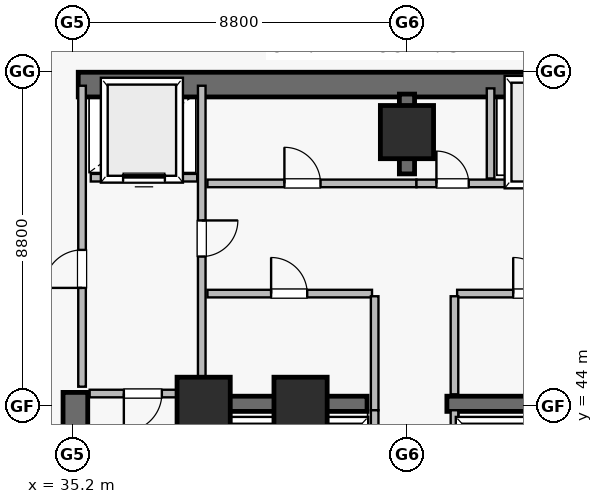
"""IFC4 building model, lengths in metres.
Left out: names, types, materials, properties, quantities, classifications, styles, units other than length and angle.
Written with IfcOpenShell. Run it as: python <this file> out.ifc"""

import sys

from ifc_helpers import new_model, si_unit, direction, frame, frame_2d, origin, origin_2d, place, context, subcontext, project, spatial, rectangle, extrude, element, fill, save


model = new_model("IFC4")
c1 = context("Model", 3, precision=1e-05, world=origin(), true_north=direction((0.0, 1.0)))
c2 = subcontext(c1, "Body", "Model", "MODEL_VIEW")
j1 = project(units=[si_unit("LENGTHUNIT", "METRE"), si_unit("PLANEANGLEUNIT", "RADIAN")], contexts=[c1])
p1 = place(None, origin())
s1 = spatial("IfcSite", under=j1, at=p1, CompositionType="ELEMENT")
p2 = place(p1, origin())
s2 = spatial("IfcBuilding", under=s1, at=p2, CompositionType="ELEMENT")
p3 = place(p2, frame((0.0, 0.0, -3.9)))
s3 = spatial("IfcBuildingStorey", under=s2, at=p3, CompositionType="ELEMENT", Elevation=-3.9)
p4 = place(p3, frame((35.35, 52.45, 0.0), z_axis=(0.0, 0.0, 1.0), x_axis=(1.0, 0.0, 0.0)))
e1 = element("IfcWall", 1, at=p4, inside=s3, PredefinedType="SHEAR", context=c2, shape_type="SweptSolid", body=[
    extrude(rectangle(XDim=17.3, YDim=0.65, at=frame_2d((8.65, 0.0))), origin(), (0.0, 0.0, 1.0), 3.6),
])
p5 = place(p3, frame((35.275, 34.95, 0.0), z_axis=(0.0, 0.0, 1.0), x_axis=(0.0, 1.0, 0.0)))
e2 = element("IfcWall", 2, at=p5, inside=s3, PredefinedType="SHEAR", context=c2, shape_type="SweptSolid", body=[
    extrude(rectangle(XDim=9.4, YDim=0.65, at=frame_2d((4.7, 0.0))), origin(), (0.0, 0.0, 1.0), 3.6),
])
p6 = place(p3, frame((38.775, 35.4, 0.0), z_axis=(0.0, 0.0, 1.0), x_axis=(0.0, 1.0, 0.0)))
e3 = element("IfcWall", 3, at=p6, inside=s3, PredefinedType="SHEAR", context=c2, shape_type="SweptSolid", body=[
    extrude(rectangle(XDim=8.95, YDim=0.65, at=frame_2d((4.475, 0.0))), origin(), (0.0, 0.0, 1.0), 3.6),
])
p7 = place(p3, frame((44.0, 50.1, 0.0), z_axis=(0.0, 0.0, 1.0), x_axis=(0.0, 1.0, 0.0)))
e4 = element("IfcWall", 4, at=p7, inside=s3, PredefinedType="SHEAR", context=c2, shape_type="SweptSolid", body=[
    extrude(rectangle(XDim=2.1, YDim=0.4, at=frame_2d((1.05, 0.0))), origin(), (0.0, 0.0, 1.0), 3.6),
])
for number, where, z_axis, x_axis in (
    (5, (38.75, 44.05, 0.0), (0.0, 0.0, 1.0), (1.0, 0.0, 0.0)),
    (6, (45.05, 44.05, 0.0), (0.0, 0.0, 1.0), (1.0, 0.0, 0.0)),
):
    element("IfcWall", number, at=place(p3, frame(where, z_axis=z_axis, x_axis=x_axis)), inside=s3, PredefinedType="SHEAR", context=c2, shape_type="SweptSolid", body=[
        extrude(rectangle(XDim=4.2, YDim=0.4, at=frame_2d((2.1, 0.0))), origin(), (0.0, 0.0, 1.0), 3.6),
    ])
for number, where, z_axis, x_axis in (
    (7, (38.65, 44.05, 0.0), (0.0, 0.0, 1.0), (1.0, 0.0, 0.0)),
    (8, (44.0, 51.2, 0.0), (0.0, 0.0, 1.0), (1.0, 0.0, 0.0)),
    (9, (41.2, 44.05, 0.0), (0.0, 0.0, 1.0), (1.0, 0.0, 0.0)),
):
    element("IfcColumn", number, at=place(p3, frame(where, z_axis=z_axis, x_axis=x_axis)), inside=s3, PredefinedType="COLUMN", context=c2, shape_type="SweptSolid", body=[
        extrude(rectangle(XDim=1.4, YDim=1.4, at=origin_2d()), origin(), (0.0, 0.0, 1.0), 3.9),
    ])
p8 = place(p3, frame((35.45, 44.5, 0.0), z_axis=(0.0, 0.0, 1.0), x_axis=(0.0, 1.0, 0.0)))
e10 = element("IfcWall", 10, at=p8, inside=s3, PredefinedType="SOLIDWALL", context=c2, shape_type="SweptSolid", body=[
    extrude(rectangle(XDim=7.92, YDim=0.2, at=frame_2d((3.96, 0.0))), origin(), (0.0, 0.0, 1.0), 3.6),
])
p9 = place(p8, frame((2.6, 0.0, 0.0)))
e11 = element("IfcOpeningElement", 11, at=p9, cuts=e10, PredefinedType="OPENING", context=c2, shape_type="SweptSolid", body=[
    extrude(rectangle(XDim=1.0, YDim=2.15, at=frame_2d((0.5, 1.075))), frame((0.0, 0.11, 0.0), z_axis=(0.0, -1.0, 0.0), x_axis=(1.0, 0.0, 0.0)), (0.0, 0.0, 1.0), 0.22),
])
p10 = place(p3, frame((38.6, 44.5, 0.0), z_axis=(0.0, 0.0, 1.0), x_axis=(0.0, 1.0, 0.0)))
e12 = element("IfcWall", 12, at=p10, inside=s3, PredefinedType="SOLIDWALL", context=c2, shape_type="SweptSolid", body=[
    extrude(rectangle(XDim=7.92, YDim=0.2, at=frame_2d((3.96, 0.0))), origin(), (0.0, 0.0, 1.0), 3.6),
])
p11 = place(p10, frame((3.425, 0.0, 0.0)))
e13 = element("IfcOpeningElement", 13, at=p11, cuts=e12, PredefinedType="OPENING", context=c2, shape_type="SweptSolid", body=[
    extrude(rectangle(XDim=0.95, YDim=2.15, at=frame_2d((0.475, 1.075))), frame((0.0, 0.11, 0.0), z_axis=(0.0, -1.0, 0.0), x_axis=(1.0, 0.0, 0.0)), (0.0, 0.0, 1.0), 0.22),
])
p12 = place(p3, frame((38.75, 49.85, 0.0), z_axis=(0.0, 0.0, 1.0), x_axis=(1.0, 0.0, 0.0)))
e14 = element("IfcWall", 14, at=p12, inside=s3, PredefinedType="SOLIDWALL", context=c2, shape_type="SweptSolid", body=[
    extrude(rectangle(XDim=5.5, YDim=0.2, at=frame_2d((2.75, 0.0))), origin(), (0.0, 0.0, 1.0), 3.6),
])
p13 = place(p12, frame((2.025, 0.0, 0.0)))
e15 = element("IfcOpeningElement", 15, at=p13, cuts=e14, PredefinedType="OPENING", context=c2, shape_type="SweptSolid", body=[
    extrude(rectangle(XDim=0.95, YDim=2.15, at=frame_2d((0.475, 1.075))), frame((0.0, 0.11, 0.0), z_axis=(0.0, -1.0, 0.0), x_axis=(1.0, 0.0, 0.0)), (0.0, 0.0, 1.0), 0.22),
])
p14 = place(p3, frame((44.25, 49.85, 0.0), z_axis=(0.0, 0.0, 1.0), x_axis=(1.0, 0.0, 0.0)))
e16 = element("IfcWall", 16, at=p14, inside=s3, PredefinedType="SOLIDWALL", context=c2, shape_type="SweptSolid", body=[
    extrude(rectangle(XDim=5.0, YDim=0.2, at=frame_2d((2.5, 0.0))), origin(), (0.0, 0.0, 1.0), 2.938),
])
p15 = place(p14, frame((0.525, 0.0, 0.0)))
e17 = element("IfcOpeningElement", 17, at=p15, cuts=e16, PredefinedType="OPENING", context=c2, shape_type="SweptSolid", body=[
    extrude(rectangle(XDim=0.85, YDim=2.1, at=frame_2d((0.425, 1.05))), frame((0.0, 0.11, 0.0), z_axis=(0.0, -1.0, 0.0), x_axis=(1.0, 0.0, 0.0)), (0.0, 0.0, 1.0), 0.22),
])
p16 = place(p14, frame((2.95, 0.0, 0.0)))
e18 = element("IfcOpeningElement", 18, at=p16, cuts=e16, PredefinedType="OPENING", context=c2, shape_type="SweptSolid", body=[
    extrude(rectangle(XDim=1.1, YDim=2.15, at=frame_2d((0.55, 1.075))), frame((0.0, 0.11, 0.0), z_axis=(0.0, -1.0, 0.0), x_axis=(1.0, 0.0, 0.0)), (0.0, 0.0, 1.0), 0.22),
])
p17 = place(p3, frame((38.75, 46.95, 0.0), z_axis=(0.0, 0.0, 1.0), x_axis=(1.0, 0.0, 0.0)))
e19 = element("IfcWall", 19, at=p17, inside=s3, PredefinedType="SOLIDWALL", context=c2, shape_type="SweptSolid", body=[
    extrude(rectangle(XDim=4.33, YDim=0.2, at=frame_2d((2.165, 0.0))), origin(), (0.0, 0.0, 1.0), 3.6),
])
p18 = place(p17, frame((1.675, 0.0, 0.0)))
e20 = element("IfcOpeningElement", 20, at=p18, cuts=e19, PredefinedType="OPENING", context=c2, shape_type="SweptSolid", body=[
    extrude(rectangle(XDim=0.95, YDim=2.15, at=frame_2d((0.475, 1.075))), frame((0.0, 0.11, 0.0), z_axis=(0.0, -1.0, 0.0), x_axis=(1.0, 0.0, 0.0)), (0.0, 0.0, 1.0), 0.22),
])
p19 = place(p3, frame((45.32, 46.95, 0.0), z_axis=(0.0, 0.0, 1.0), x_axis=(1.0, 0.0, 0.0)))
e21 = element("IfcWall", 21, at=p19, inside=s3, PredefinedType="SOLIDWALL", context=c2, shape_type="SweptSolid", body=[
    extrude(rectangle(XDim=3.93, YDim=0.2, at=frame_2d((1.965, 0.0))), origin(), (0.0, 0.0, 1.0), 2.938),
])
p20 = place(p19, frame((1.475, 0.0, 0.0)))
e22 = element("IfcOpeningElement", 22, at=p20, cuts=e21, PredefinedType="OPENING", context=c2, shape_type="SweptSolid", body=[
    extrude(rectangle(XDim=0.95, YDim=2.15, at=frame_2d((0.475, 1.075))), frame((0.0, 0.11, 0.0), z_axis=(0.0, -1.0, 0.0), x_axis=(1.0, 0.0, 0.0)), (0.0, 0.0, 1.0), 0.22),
])
p21 = place(p3, frame((35.65, 44.32, 0.0), z_axis=(0.0, 0.0, 1.0), x_axis=(1.0, 0.0, 0.0)))
e23 = element("IfcWall", 23, at=p21, inside=s3, PredefinedType="SOLIDWALL", context=c2, shape_type="SweptSolid", body=[
    extrude(rectangle(XDim=2.8, YDim=0.2, at=frame_2d((1.4, 0.0))), origin(), (0.0, 0.0, 1.0), 3.6),
])
p22 = place(p21, frame((0.9, 0.0, 0.0)))
e24 = element("IfcOpeningElement", 24, at=p22, cuts=e23, PredefinedType="OPENING", context=c2, shape_type="SweptSolid", body=[
    extrude(rectangle(XDim=1.0, YDim=2.15, at=frame_2d((0.5, 1.075))), frame((0.0, 0.11, 0.0), z_axis=(0.0, -1.0, 0.0), x_axis=(1.0, 0.0, 0.0)), (0.0, 0.0, 1.0), 0.22),
])
p23 = place(p3, frame((35.68, 50.0, 0.0), z_axis=(0.0, 0.0, 1.0), x_axis=(1.0, 0.0, 0.0)))
e25 = element("IfcWall", 25, at=p23, inside=s3, PredefinedType="SOLIDWALL", context=c2, shape_type="SweptSolid", body=[
    extrude(rectangle(XDim=2.8, YDim=0.2, at=frame_2d((1.4, 0.0))), origin(), (0.0, 0.0, 1.0), 3.6),
])
p24 = place(p23, frame((0.85, 0.0, 0.0)))
e26 = element("IfcOpeningElement", 26, at=p24, cuts=e25, PredefinedType="OPENING", context=c2, shape_type="SweptSolid", body=[
    extrude(rectangle(XDim=1.1, YDim=2.15, at=frame_2d((0.55, 1.075))), frame((0.0, 0.11, 0.0), z_axis=(0.0, -1.0, 0.0), x_axis=(1.0, 0.0, 0.0)), (0.0, 0.0, 1.0), 0.22),
])
p25 = place(p3, frame((43.15, 43.88, 0.0), z_axis=(0.0, 0.0, 1.0), x_axis=(0.0, 1.0, 0.0)))
e27 = element("IfcWall", 27, at=p25, inside=s3, PredefinedType="SOLIDWALL", context=c2, shape_type="SweptSolid", body=[
    extrude(rectangle(XDim=3.0, YDim=0.2, at=frame_2d((1.5, 0.0))), origin(), (0.0, 0.0, 1.0), 3.6),
])
p26 = place(p3, frame((45.25, 44.3, 0.0), z_axis=(0.0, 0.0, 1.0), x_axis=(0.0, 1.0, 0.0)))
e28 = element("IfcWall", 28, at=p26, inside=s3, PredefinedType="SOLIDWALL", context=c2, shape_type="SweptSolid", body=[
    extrude(rectangle(XDim=2.58, YDim=0.2, at=frame_2d((1.29, 0.0))), origin(), (0.0, 0.0, 1.0), 3.6),
])
for number, where, z_axis, x_axis in (
    (29, (43.15, 41.32, 0.0), (0.0, 0.0, 1.0), (0.0, 1.0, 0.0)),
    (30, (45.25, 41.32, 0.0), (0.0, 0.0, 1.0), (0.0, 1.0, 0.0)),
):
    element("IfcWall", number, at=place(p3, frame(where, z_axis=z_axis, x_axis=x_axis)), inside=s3, PredefinedType="SOLIDWALL", context=c2, shape_type="SweptSolid", body=[
        extrude(rectangle(XDim=2.56, YDim=0.2, at=frame_2d((1.28, 0.0))), origin(), (0.0, 0.0, 1.0), 3.6),
    ])
p27 = place(p3, frame((40.9, 41.32, 0.0), z_axis=(0.0, 0.0, 1.0), x_axis=(0.0, 1.0, 0.0)))
e31 = element("IfcWall", 31, at=p27, inside=s3, PredefinedType="SOLIDWALL", context=c2, shape_type="SweptSolid", body=[
    extrude(rectangle(XDim=2.53, YDim=0.16, at=frame_2d((1.265, 0.0))), origin(), (0.0, 0.0, 1.0), 3.6),
])
p28 = place(p3, frame((46.2, 49.98, 0.0), z_axis=(0.0, 0.0, 1.0), x_axis=(0.0, 1.0, 0.0)))
e32 = element("IfcWall", 32, at=p28, inside=s3, PredefinedType="SOLIDWALL", context=c2, shape_type="SweptSolid", body=[
    extrude(rectangle(XDim=2.37, YDim=0.2, at=frame_2d((1.185, 0.0))), origin(), (0.0, 0.0, 1.0), 3.6),
])
p29 = place(p22, frame((1.0, 0.0, 0.0), z_axis=(0.0, 0.0, 1.0), x_axis=(-1.0, 0.0, 0.0)))
e33 = element("IfcDoor", 33, at=p29, inside=s3, OperationType="SINGLE_SWING_LEFT", PredefinedType="DOOR", context=c2, shape_type="SweptSolid", body=[
    extrude(rectangle(XDim=1.0, YDim=2.15, at=frame_2d((0.5, 1.075))), frame((0.0, 0.025, 0.0), z_axis=(0.0, -1.0, 0.0), x_axis=(1.0, 0.0, 0.0)), (0.0, 0.0, 1.0), 0.05),
])
fill(e24, e33)
p30 = place(p9, origin())
e34 = element("IfcDoor", 34, at=p30, inside=s3, OperationType="SINGLE_SWING_LEFT", PredefinedType="DOOR", context=c2, shape_type="SweptSolid", body=[
    extrude(rectangle(XDim=1.0, YDim=2.15, at=frame_2d((0.5, 1.075))), frame((0.0, 0.025, 0.0), z_axis=(0.0, -1.0, 0.0), x_axis=(1.0, 0.0, 0.0)), (0.0, 0.0, 1.0), 0.05),
])
fill(e11, e34)
p31 = place(p11, frame((0.95, 0.0, 0.0), z_axis=(0.0, 0.0, 1.0), x_axis=(-1.0, 0.0, 0.0)))
e35 = element("IfcDoor", 35, at=p31, inside=s3, OperationType="SINGLE_SWING_RIGHT", PredefinedType="DOOR", context=c2, shape_type="SweptSolid", body=[
    extrude(rectangle(XDim=0.95, YDim=2.15, at=frame_2d((0.475, 1.075))), frame((0.0, 0.025, 0.0), z_axis=(0.0, -1.0, 0.0), x_axis=(1.0, 0.0, 0.0)), (0.0, 0.0, 1.0), 0.05),
])
fill(e13, e35)
p32 = place(p24, origin())
e36 = element("IfcDoor", 36, at=p32, inside=s3, OperationType="SLIDING_TO_LEFT", PredefinedType="DOOR", context=c2, shape_type="SweptSolid", body=[
    extrude(rectangle(XDim=1.1, YDim=2.15, at=frame_2d((0.55, 1.075))), frame((0.0, 0.025, 0.0), z_axis=(0.0, -1.0, 0.0), x_axis=(1.0, 0.0, 0.0)), (0.0, 0.0, 1.0), 0.05),
])
fill(e26, e36)
p33 = place(p13, origin())
e37 = element("IfcDoor", 37, at=p33, inside=s3, OperationType="SINGLE_SWING_LEFT", PredefinedType="DOOR", context=c2, shape_type="SweptSolid", body=[
    extrude(rectangle(XDim=0.95, YDim=2.15, at=frame_2d((0.475, 1.075))), frame((0.0, 0.025, 0.0), z_axis=(0.0, -1.0, 0.0), x_axis=(1.0, 0.0, 0.0)), (0.0, 0.0, 1.0), 0.05),
])
fill(e15, e37)
p34 = place(p15, origin())
e38 = element("IfcDoor", 38, at=p34, inside=s3, OperationType="SINGLE_SWING_LEFT", PredefinedType="DOOR", context=c2, shape_type="SweptSolid", body=[
    extrude(rectangle(XDim=0.85, YDim=2.1, at=frame_2d((0.425, 1.05))), frame((0.0, 0.025, 0.0), z_axis=(0.0, -1.0, 0.0), x_axis=(1.0, 0.0, 0.0)), (0.0, 0.0, 1.0), 0.05),
])
fill(e17, e38)
p35 = place(p18, origin())
e39 = element("IfcDoor", 39, at=p35, inside=s3, OperationType="SINGLE_SWING_LEFT", PredefinedType="DOOR", context=c2, shape_type="SweptSolid", body=[
    extrude(rectangle(XDim=0.95, YDim=2.15, at=frame_2d((0.475, 1.075))), frame((0.0, 0.025, 0.0), z_axis=(0.0, -1.0, 0.0), x_axis=(1.0, 0.0, 0.0)), (0.0, 0.0, 1.0), 0.05),
])
fill(e20, e39)
p36 = place(p20, origin())
e40 = element("IfcDoor", 40, at=p36, inside=s3, OperationType="SINGLE_SWING_LEFT", PredefinedType="DOOR", context=c2, shape_type="SweptSolid", body=[
    extrude(rectangle(XDim=0.95, YDim=2.15, at=frame_2d((0.475, 1.075))), frame((0.0, 0.025, 0.0), z_axis=(0.0, -1.0, 0.0), x_axis=(1.0, 0.0, 0.0)), (0.0, 0.0, 1.0), 0.05),
])
fill(e22, e40)
save(model, sys.argv[1])
